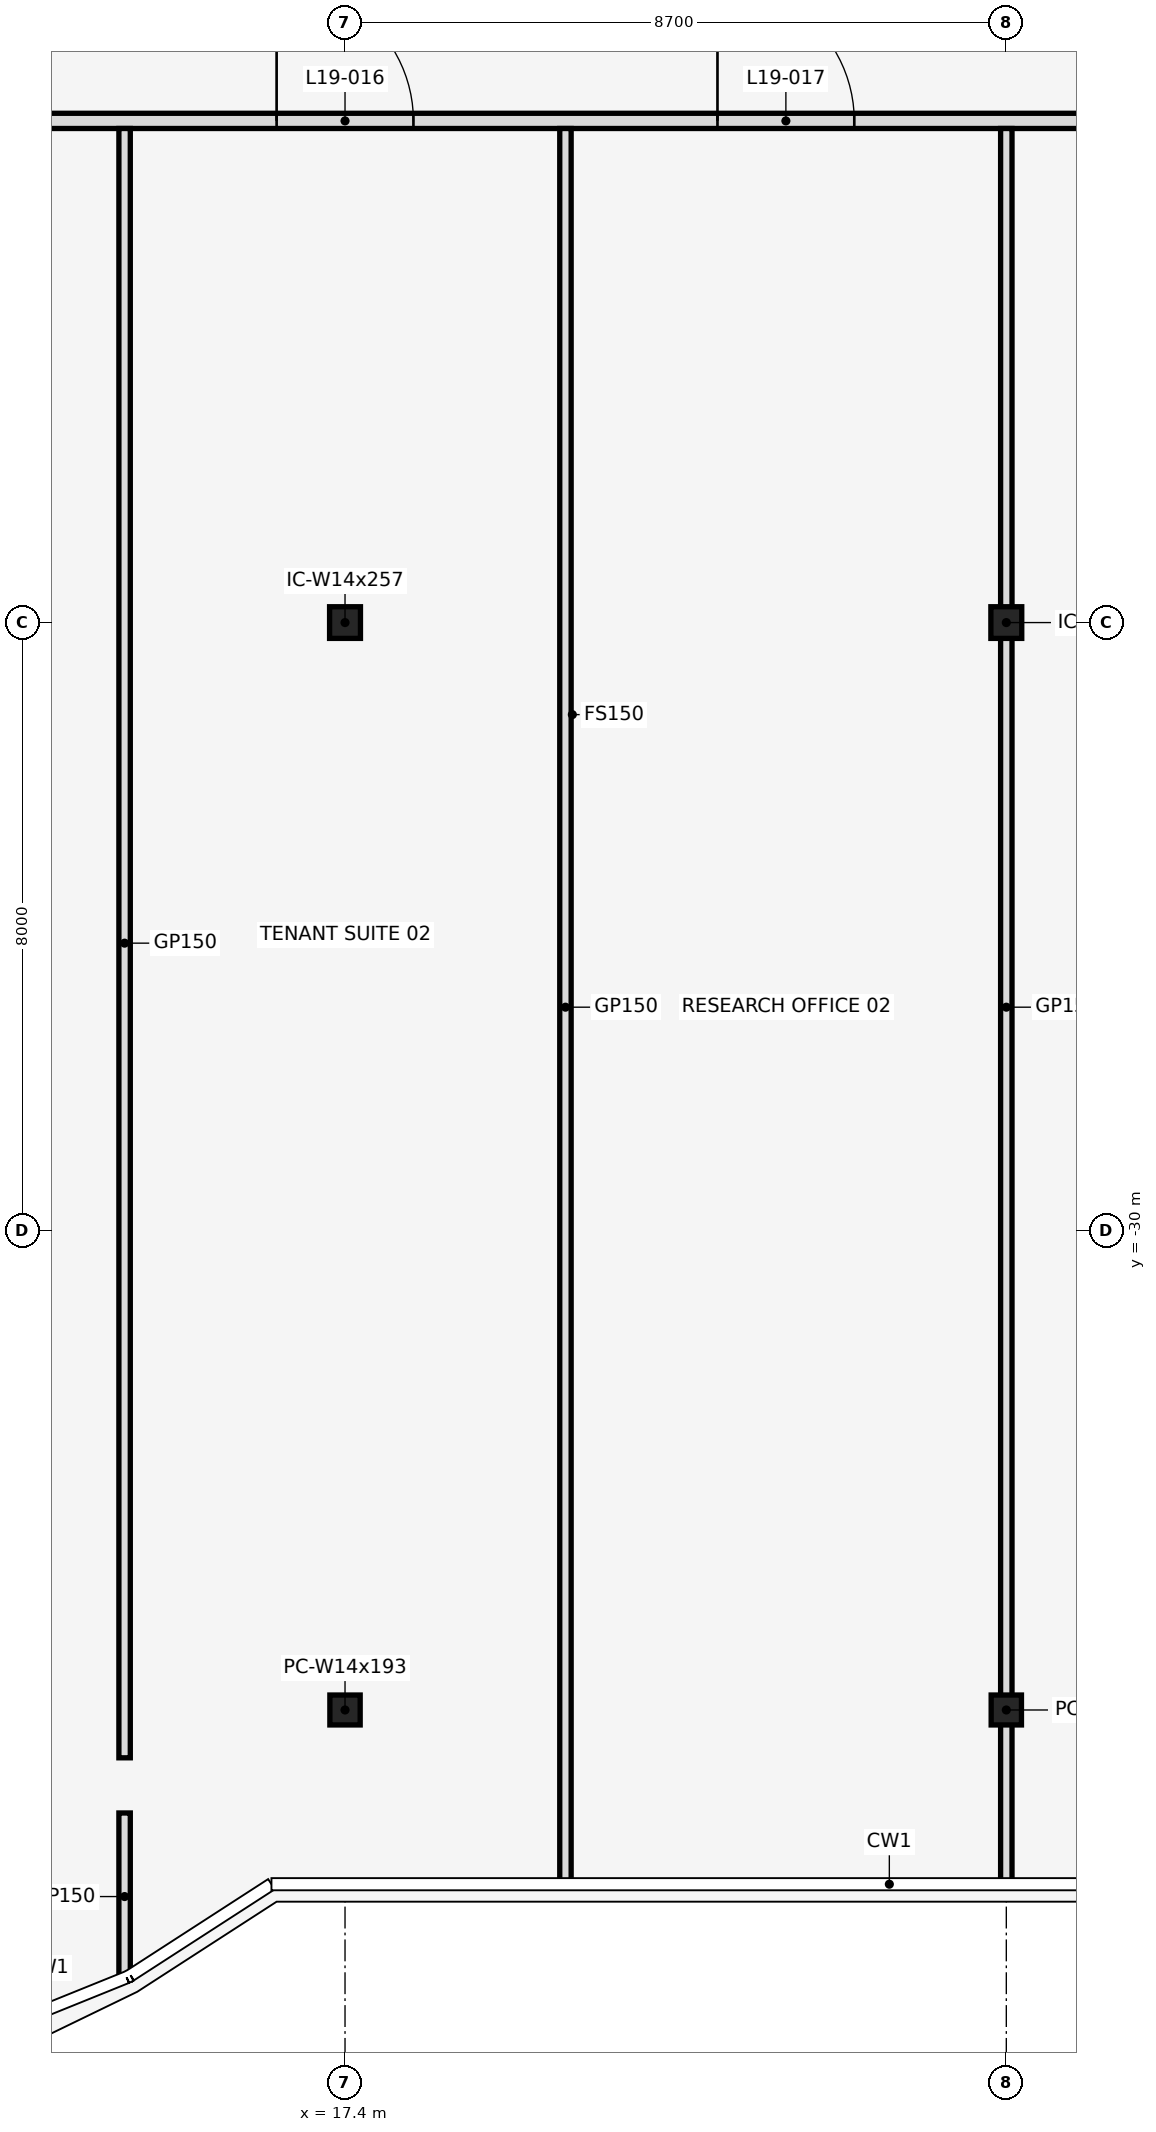
"""IFC4 building model, lengths in metres.
Left out: names, types, materials, properties, quantities, classifications, styles, units other than length and angle.
Written with IfcOpenShell. Run it as: python <this file> out.ifc"""

import sys

from ifc_helpers import new_model, si_unit, direction, frame, frame_2d, origin, origin_2d, place, context, subcontext, project, spatial, rectangle, i_section, extrude, element, fill, save


model = new_model("IFC4")
c1 = context("Model", 3, precision=1e-05, world=origin(), true_north=direction((0.0, 1.0)))
c2 = subcontext(c1, "Body", "Model", "MODEL_VIEW")
j1 = project(units=[si_unit("LENGTHUNIT", "METRE"), si_unit("PLANEANGLEUNIT", "RADIAN")], contexts=[c1])
p1 = place(None, origin())
s1 = spatial("IfcSite", under=j1, at=p1, CompositionType="ELEMENT")
p2 = place(p1, origin())
s2 = spatial("IfcBuilding", under=s1, at=p2, CompositionType="ELEMENT")
p3 = place(p2, frame((0.0, 0.0, 94.0)))
s3 = spatial("IfcBuildingStorey", under=s2, at=p3, CompositionType="ELEMENT", Elevation=94.0)
for number, where, z_axis, x_axis in (
    (1, (17.4, -36.306, 0.0), (0.0, 0.0, 1.0), (1.0, 0.0, 0.0)),
    (2, (26.1, -36.306, 0.0), (0.0, 0.0, 1.0), (1.0, 0.0, 0.0)),
):
    element("IfcColumn", number, at=place(p3, frame(where, z_axis=z_axis, x_axis=x_axis)), inside=s3, PredefinedType="COLUMN", context=c2, shape_type="SweptSolid", body=[
        extrude(i_section(OverallWidth=0.399, OverallDepth=0.394, WebThickness=0.023, FlangeThickness=0.037, at=origin_2d()), origin(), (0.0, 0.0, 1.0), 4.1),
    ])
for number, where, z_axis, x_axis in (
    (3, (17.4, -22.0, 0.0), (0.0, 0.0, 1.0), (1.0, 0.0, 0.0)),
    (4, (26.1, -22.0, 0.0), (0.0, 0.0, 1.0), (1.0, 0.0, 0.0)),
):
    element("IfcColumn", number, at=place(p3, frame(where, z_axis=z_axis, x_axis=x_axis)), inside=s3, PredefinedType="COLUMN", context=c2, shape_type="SweptSolid", body=[
        extrude(i_section(OverallWidth=0.406, OverallDepth=0.417, WebThickness=0.03, FlangeThickness=0.048, at=origin_2d()), origin(), (0.0, 0.0, 1.0), 4.1),
    ])
p4 = place(p3, frame((-33.27, -15.4, 0.0), z_axis=(0.0, 0.0, 1.0), x_axis=(1.0, 0.0, 0.0)))
e5 = element("IfcWall", 5, at=p4, inside=s3, PredefinedType="PARTITIONING", context=c2, shape_type="SweptSolid", body=[
    extrude(rectangle(XDim=66.54, YDim=0.2, at=frame_2d((33.27, 0.0))), origin(), (0.0, 0.0, 1.0), 3.018),
])
p5 = place(p4, frame((2.7, 0.0, 0.0)))
e6 = element("IfcOpeningElement", 6, at=p5, cuts=e5, PredefinedType="OPENING", context=c2, shape_type="SweptSolid", body=[
    extrude(rectangle(XDim=1.8, YDim=2.1, at=frame_2d((0.9, 1.05))), frame((0.0, 0.112, 0.0), z_axis=(0.0, -1.0, 0.0), x_axis=(1.0, 0.0, 0.0)), (0.0, 0.0, 1.0), 0.224),
])
p6 = place(p4, frame((11.07, 0.0, 0.0)))
e7 = element("IfcOpeningElement", 7, at=p6, cuts=e5, PredefinedType="OPENING", context=c2, shape_type="SweptSolid", body=[
    extrude(rectangle(XDim=0.9, YDim=2.1, at=frame_2d((0.45, 1.05))), frame((0.0, 0.112, 0.0), z_axis=(0.0, -1.0, 0.0), x_axis=(1.0, 0.0, 0.0)), (0.0, 0.0, 1.0), 0.224),
])
p7 = place(p4, frame((17.87, 0.0, 0.0)))
e8 = element("IfcOpeningElement", 8, at=p7, cuts=e5, PredefinedType="OPENING", context=c2, shape_type="SweptSolid", body=[
    extrude(rectangle(XDim=1.8, YDim=2.1, at=frame_2d((0.9, 1.05))), frame((0.0, 0.112, 0.0), z_axis=(0.0, -1.0, 0.0), x_axis=(1.0, 0.0, 0.0)), (0.0, 0.0, 1.0), 0.224),
])
p8 = place(p4, frame((25.07, 0.0, 0.0)))
e9 = element("IfcOpeningElement", 9, at=p8, cuts=e5, PredefinedType="OPENING", context=c2, shape_type="SweptSolid", body=[
    extrude(rectangle(XDim=1.8, YDim=2.1, at=frame_2d((0.9, 1.05))), frame((0.0, 0.112, 0.0), z_axis=(0.0, -1.0, 0.0), x_axis=(1.0, 0.0, 0.0)), (0.0, 0.0, 1.0), 0.224),
])
p9 = place(p4, frame((35.27, 0.0, 0.0)))
e10 = element("IfcOpeningElement", 10, at=p9, cuts=e5, PredefinedType="OPENING", context=c2, shape_type="SweptSolid", body=[
    extrude(rectangle(XDim=1.8, YDim=2.1, at=frame_2d((0.9, 1.05))), frame((0.0, 0.112, 0.0), z_axis=(0.0, -1.0, 0.0), x_axis=(1.0, 0.0, 0.0)), (0.0, 0.0, 1.0), 0.224),
])
p10 = place(p4, frame((43.97, 0.0, 0.0)))
e11 = element("IfcOpeningElement", 11, at=p10, cuts=e5, PredefinedType="OPENING", context=c2, shape_type="SweptSolid", body=[
    extrude(rectangle(XDim=1.8, YDim=2.1, at=frame_2d((0.9, 1.05))), frame((0.0, 0.112, 0.0), z_axis=(0.0, -1.0, 0.0), x_axis=(1.0, 0.0, 0.0)), (0.0, 0.0, 1.0), 0.224),
])
p11 = place(p4, frame((49.77, 0.0, 0.0)))
e12 = element("IfcOpeningElement", 12, at=p11, cuts=e5, PredefinedType="OPENING", context=c2, shape_type="SweptSolid", body=[
    extrude(rectangle(XDim=1.8, YDim=2.1, at=frame_2d((0.9, 1.05))), frame((0.0, 0.112, 0.0), z_axis=(0.0, -1.0, 0.0), x_axis=(1.0, 0.0, 0.0)), (0.0, 0.0, 1.0), 0.224),
])
p12 = place(p4, frame((55.57, 0.0, 0.0)))
e13 = element("IfcOpeningElement", 13, at=p12, cuts=e5, PredefinedType="OPENING", context=c2, shape_type="SweptSolid", body=[
    extrude(rectangle(XDim=1.8, YDim=2.1, at=frame_2d((0.9, 1.05))), frame((0.0, 0.112, 0.0), z_axis=(0.0, -1.0, 0.0), x_axis=(1.0, 0.0, 0.0)), (0.0, 0.0, 1.0), 0.224),
])
p13 = place(p4, frame((62.07, 0.0, 0.0)))
e14 = element("IfcOpeningElement", 14, at=p13, cuts=e5, PredefinedType="OPENING", context=c2, shape_type="SweptSolid", body=[
    extrude(rectangle(XDim=1.8, YDim=2.1, at=frame_2d((0.9, 1.05))), frame((0.0, 0.112, 0.0), z_axis=(0.0, -1.0, 0.0), x_axis=(1.0, 0.0, 0.0)), (0.0, 0.0, 1.0), 0.224),
])
p14 = place(p3, frame((14.5, -39.86, 0.0), z_axis=(0.0, 0.0, 1.0), x_axis=(0.0, 1.0, 0.0)))
e15 = element("IfcWall", 15, at=p14, inside=s3, PredefinedType="PARTITIONING", context=c2, shape_type="SweptSolid", body=[
    extrude(rectangle(XDim=2.199, YDim=0.15, at=frame_2d((1.1, 0.0))), origin(), (0.0, 0.0, 1.0), 3.018),
])
p15 = place(p3, frame((14.5, -36.935, 0.0), z_axis=(0.0, 0.0, 1.0), x_axis=(0.0, 1.0, 0.0)))
e16 = element("IfcWall", 16, at=p15, inside=s3, PredefinedType="PARTITIONING", context=c2, shape_type="SweptSolid", body=[
    extrude(rectangle(XDim=21.435, YDim=0.15, at=frame_2d((10.718, 0.0))), origin(), (0.0, 0.0, 1.0), 3.018),
])
for number, where, z_axis, x_axis in (
    (17, (20.3, -38.62, 0.0), (0.0, 0.0, 1.0), (0.0, 1.0, 0.0)),
    (18, (26.1, -38.62, 0.0), (0.0, 0.0, 1.0), (0.0, 1.0, 0.0)),
):
    element("IfcWall", number, at=place(p3, frame(where, z_axis=z_axis, x_axis=x_axis)), inside=s3, PredefinedType="PARTITIONING", context=c2, shape_type="SweptSolid", body=[
        extrude(rectangle(XDim=23.12, YDim=0.15, at=frame_2d((11.56, 0.0))), origin(), (0.0, 0.0, 1.0), 3.018),
    ])
p16 = place(p11, origin())
e19 = element("IfcDoor", 19, at=p16, inside=s3, OperationType="SINGLE_SWING_LEFT", PredefinedType="DOOR", context=c2, shape_type="SweptSolid", body=[
    extrude(rectangle(XDim=1.8, YDim=2.1, at=frame_2d((0.9, 1.05))), frame((0.0, 0.025, 0.0), z_axis=(0.0, -1.0, 0.0), x_axis=(1.0, 0.0, 0.0)), (0.0, 0.0, 1.0), 0.05),
])
fill(e12, e19)
p17 = place(p12, origin())
e20 = element("IfcDoor", 20, at=p17, inside=s3, OperationType="SINGLE_SWING_LEFT", PredefinedType="DOOR", context=c2, shape_type="SweptSolid", body=[
    extrude(rectangle(XDim=1.8, YDim=2.1, at=frame_2d((0.9, 1.05))), frame((0.0, 0.025, 0.0), z_axis=(0.0, -1.0, 0.0), x_axis=(1.0, 0.0, 0.0)), (0.0, 0.0, 1.0), 0.05),
])
fill(e13, e20)
save(model, sys.argv[1])
